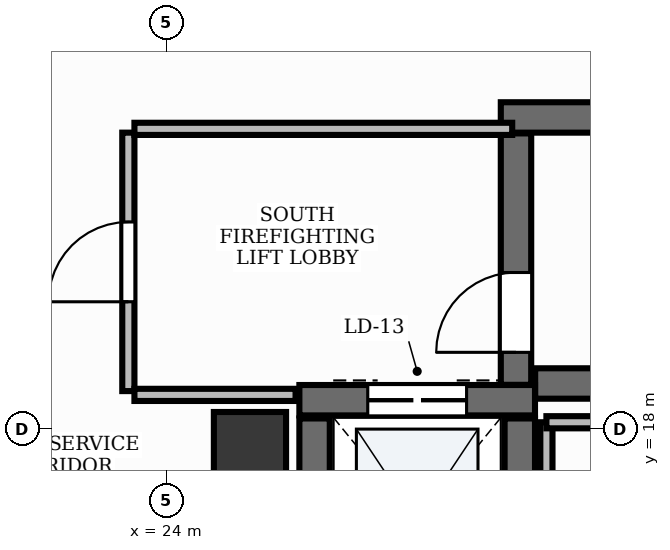
"""IFC4 building model, lengths in metres.
Left out: names, types, materials, properties, quantities, classifications, styles, units other than length and angle.
Written with IfcOpenShell. Run it as: python <this file> out.ifc"""

import sys

from ifc_helpers import new_model, si_unit, direction, frame, frame_2d, origin, origin_2d, place, context, subcontext, project, spatial, rectangle, extrude, element, fill, save


model = new_model("IFC4")
c1 = context("Model", 3, precision=1e-05, world=origin(), true_north=direction((0.0, 1.0)))
c2 = subcontext(c1, "Body", "Model", "MODEL_VIEW")
j1 = project(units=[si_unit("LENGTHUNIT", "METRE"), si_unit("PLANEANGLEUNIT", "RADIAN")], contexts=[c1])
p1 = place(None, origin())
s1 = spatial("IfcSite", under=j1, at=p1, CompositionType="ELEMENT")
p2 = place(p1, origin())
s2 = spatial("IfcBuilding", under=s1, at=p2, CompositionType="ELEMENT")
p3 = place(p2, frame((0.0, 0.0, 277.2)))
s3 = spatial("IfcBuildingStorey", under=s2, at=p3, CompositionType="ELEMENT", Elevation=277.2)
p4 = place(p3, frame((28.852, 18.6, 0.0), z_axis=(0.0, 0.0, 1.0), x_axis=(1.0, 0.0, 0.0)))
e1 = element("IfcWall", 1, at=p4, inside=s3, PredefinedType="SHEAR", context=c2, shape_type="SweptSolid", body=[
    extrude(rectangle(XDim=8.198, YDim=0.4, at=frame_2d((4.099, 0.0))), origin(), (0.0, 0.0, 1.0), 5.1),
])
p5 = place(p3, frame((28.4, 22.1, 0.0), z_axis=(0.0, 0.0, 1.0), x_axis=(1.0, 0.0, 0.0)))
e2 = element("IfcWall", 2, at=p5, inside=s3, PredefinedType="SHEAR", context=c2, shape_type="SweptSolid", body=[
    extrude(rectangle(XDim=8.65, YDim=0.4, at=frame_2d((4.325, 0.0))), origin(), (0.0, 0.0, 1.0), 5.1),
])
p6 = place(p3, frame((28.6, 18.582, 0.0), z_axis=(0.0, 0.0, 1.0), x_axis=(0.0, 1.0, 0.0)))
e3 = element("IfcWall", 3, at=p6, inside=s3, PredefinedType="SHEAR", context=c2, shape_type="SweptSolid", body=[
    extrude(rectangle(XDim=3.308, YDim=0.4, at=frame_2d((1.654, 0.0))), origin(), (0.0, 0.0, 1.0), 5.1),
])
p7 = place(p6, frame((0.428, 0.0, 0.0)))
e4 = element("IfcOpeningElement", 4, at=p7, cuts=e3, PredefinedType="OPENING", context=c2, shape_type="SweptSolid", body=[
    extrude(rectangle(XDim=1.05, YDim=2.15, at=frame_2d((0.525, 1.075))), frame((0.0, 0.215, 0.0), z_axis=(0.0, -1.0, 0.0), x_axis=(1.0, 0.0, 0.0)), (0.0, 0.0, 1.0), 0.43),
])
p8 = place(p3, frame((25.75, 18.38, 0.0), z_axis=(0.0, 0.0, 1.0), x_axis=(1.0, 0.0, 0.0)))
e5 = element("IfcWall", 5, at=p8, inside=s3, PredefinedType="SHEAR", context=c2, shape_type="SweptSolid", body=[
    extrude(rectangle(XDim=3.1, YDim=0.4, at=frame_2d((1.55, 0.0))), origin(), (0.0, 0.0, 1.0), 5.1),
])
p9 = place(p8, frame((0.9, 0.0, 0.0)))
e6 = element("IfcOpeningElement", 6, at=p9, cuts=e5, PredefinedType="OPENING", context=c2, shape_type="SweptSolid", body=[
    extrude(rectangle(XDim=1.3, YDim=2.2, at=frame_2d((0.65, 1.1))), frame((0.0, 0.215, 0.0), z_axis=(0.0, -1.0, 0.0), x_axis=(1.0, 0.0, 0.0)), (0.0, 0.0, 1.0), 0.43),
])
for number, where, z_axis, x_axis in (
    (7, (25.95, 15.44, 0.0), (0.0, 0.0, 1.0), (0.0, 1.0, 0.0)),
    (8, (28.65, 15.44, 0.0), (0.0, 0.0, 1.0), (0.0, 1.0, 0.0)),
):
    element("IfcWall", number, at=place(p3, frame(where, z_axis=z_axis, x_axis=x_axis)), inside=s3, PredefinedType="SHEAR", context=c2, shape_type="SweptSolid", body=[
        extrude(rectangle(XDim=2.7, YDim=0.4, at=frame_2d((1.35, 0.0))), origin(), (0.0, 0.0, 1.0), 5.1),
    ])
p10 = place(p3, frame((25.1, 17.75, -0.0), z_axis=(0.0, 0.0, 1.0), x_axis=(1.0, 0.0, 0.0)))
e9 = element("IfcColumn", 9, at=p10, inside=s3, PredefinedType="PILASTER", context=c2, shape_type="SweptSolid", body=[
    extrude(rectangle(XDim=0.95, YDim=0.95, at=origin_2d()), origin(), (0.0, 0.0, 1.0), 5.101),
])
p11 = place(p3, frame((23.5, 18.5, 0.0), z_axis=(0.0, 0.0, 1.0), x_axis=(0.0, 1.0, 0.0)))
e10 = element("IfcWall", 10, at=p11, inside=s3, PredefinedType="PARTITIONING", context=c2, shape_type="SweptSolid", body=[
    extrude(rectangle(XDim=3.4, YDim=0.16, at=frame_2d((1.7, 0.0))), origin(), (0.0, 0.0, 1.0), 3.41),
])
p12 = place(p11, frame((1.175, 0.0, 0.0)))
e11 = element("IfcOpeningElement", 11, at=p12, cuts=e10, PredefinedType="OPENING", context=c2, shape_type="SweptSolid", body=[
    extrude(rectangle(XDim=1.05, YDim=2.15, at=frame_2d((0.525, 1.075))), frame((0.0, 0.095, 0.0), z_axis=(0.0, -1.0, 0.0), x_axis=(1.0, 0.0, 0.0)), (0.0, 0.0, 1.0), 0.19),
])
p13 = place(p3, frame((23.58, 21.95, 0.0), z_axis=(0.0, 0.0, 1.0), x_axis=(1.0, 0.0, 0.0)))
e12 = element("IfcWall", 12, at=p13, inside=s3, PredefinedType="PARTITIONING", context=c2, shape_type="SweptSolid", body=[
    extrude(rectangle(XDim=4.97, YDim=0.16, at=frame_2d((2.485, 0.0))), origin(), (0.0, 0.0, 1.0), 3.41),
])
p14 = place(p3, frame((23.58, 18.45, 0.0), z_axis=(0.0, 0.0, 1.0), x_axis=(1.0, 0.0, 0.0)))
e13 = element("IfcWall", 13, at=p14, inside=s3, PredefinedType="PARTITIONING", context=c2, shape_type="SweptSolid", body=[
    extrude(rectangle(XDim=2.12, YDim=0.16, at=frame_2d((1.06, 0.0))), origin(), (0.0, 0.0, 1.0), 3.41),
])
p15 = place(p3, frame((29.0, 14.954, 0.0), z_axis=(0.0, 0.0, 1.0), x_axis=(0.0, 1.0, 0.0)))
e14 = element("IfcWall", 14, at=p15, inside=s3, PredefinedType="PARTITIONING", context=c2, shape_type="SweptSolid", body=[
    extrude(rectangle(XDim=3.136, YDim=0.16, at=frame_2d((1.568, 0.0))), origin(), (0.0, 0.0, 1.0), 3.41),
])
p16 = place(p3, frame((29.0, 18.09, 0.0), z_axis=(0.0, 0.0, 1.0), x_axis=(1.0, 0.0, 0.0)))
e15 = element("IfcWall", 15, at=p16, inside=s3, PredefinedType="PARTITIONING", context=c2, shape_type="SweptSolid", body=[
    extrude(rectangle(XDim=7.328, YDim=0.16, at=frame_2d((3.664, 0.0))), origin(), (0.0, 0.0, 1.0), 3.41),
])
p17 = place(p7, origin())
e16 = element("IfcDoor", 16, at=p17, inside=s3, OperationType="SINGLE_SWING_LEFT", PredefinedType="DOOR", context=c2, shape_type="SweptSolid", body=[
    extrude(rectangle(XDim=1.05, YDim=2.15, at=frame_2d((0.525, 1.075))), frame((0.0, 0.025, 0.0), z_axis=(0.0, -1.0, 0.0), x_axis=(1.0, 0.0, 0.0)), (0.0, 0.0, 1.0), 0.05),
])
fill(e4, e16)
p18 = place(p9, origin())
e17 = element("IfcDoor", 17, at=p18, inside=s3, OperationType="DOUBLE_DOOR_SLIDING", PredefinedType="DOOR", context=c2, shape_type="SweptSolid", body=[
    extrude(rectangle(XDim=1.3, YDim=2.2, at=frame_2d((0.65, 1.1))), frame((0.0, 0.025, 0.0), z_axis=(0.0, -1.0, 0.0), x_axis=(1.0, 0.0, 0.0)), (0.0, 0.0, 1.0), 0.05),
])
fill(e6, e17)
p19 = place(p12, origin())
e18 = element("IfcDoor", 18, at=p19, inside=s3, OperationType="SINGLE_SWING_LEFT", PredefinedType="DOOR", context=c2, shape_type="SweptSolid", body=[
    extrude(rectangle(XDim=1.05, YDim=2.15, at=frame_2d((0.525, 1.075))), frame((0.0, 0.025, 0.0), z_axis=(0.0, -1.0, 0.0), x_axis=(1.0, 0.0, 0.0)), (0.0, 0.0, 1.0), 0.05),
])
fill(e11, e18)
save(model, sys.argv[1])
